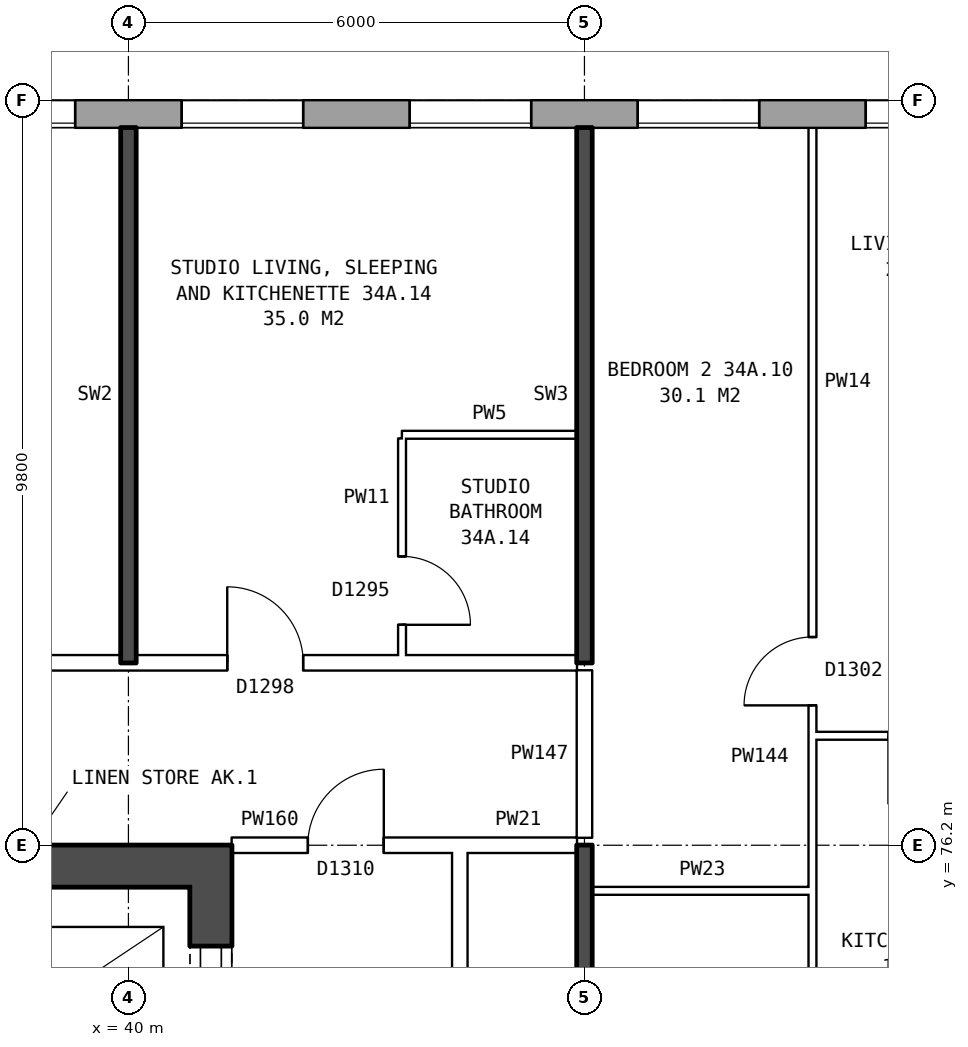
"""IFC4 building model, lengths in metres.
Left out: names, types, materials, properties, quantities, classifications, styles, units other than length and angle.
Written with IfcOpenShell. Run it as: python <this file> out.ifc"""

import sys

from ifc_helpers import new_model, si_unit, direction, frame, frame_2d, origin, place, context, subcontext, project, spatial, rectangle, extrude, element, fill, save


model = new_model("IFC4")
c1 = context("Model", 3, precision=1e-05, world=origin(), true_north=direction((0.0, 1.0)))
c2 = subcontext(c1, "Body", "Model", "MODEL_VIEW")
j1 = project(units=[si_unit("LENGTHUNIT", "METRE"), si_unit("PLANEANGLEUNIT", "RADIAN")], contexts=[c1])
p1 = place(None, origin())
s1 = spatial("IfcSite", under=j1, at=p1, CompositionType="ELEMENT")
p2 = place(p1, origin())
s2 = spatial("IfcBuilding", under=s1, at=p2, CompositionType="ELEMENT")
p3 = place(p2, frame((0.0, 0.0, 123.7)))
s3 = spatial("IfcBuildingStorey", under=s2, at=p3, CompositionType="ELEMENT", Elevation=123.7)
p4 = place(p3, frame((72.925, 85.82, 0.0), z_axis=(0.0, 0.0, 1.0), x_axis=(-1.0, 0.0, 0.0)))
e1 = element("IfcWall", 1, at=p4, inside=s3, PredefinedType="STANDARD", context=c2, shape_type="SweptSolid", body=[
    extrude(rectangle(XDim=43.101, YDim=0.36, at=frame_2d((21.55, 0.0))), origin(), (0.0, 0.0, 1.0), 2.85),
])
p5 = place(p4, frame((0.625, 0.0, 0.8)))
e2 = element("IfcOpeningElement", 2, at=p5, cuts=e1, PredefinedType="OPENING", context=c2, shape_type="SweptSolid", body=[
    extrude(rectangle(XDim=1.6, YDim=1.8, at=frame_2d((0.8, 0.9))), frame((0.0, 0.19, 0.0), z_axis=(0.0, -1.0, 0.0), x_axis=(1.0, 0.0, 0.0)), (0.0, 0.0, 1.0), 0.38),
])
p6 = place(p4, frame((4.125, 0.0, 0.8)))
e3 = element("IfcOpeningElement", 3, at=p6, cuts=e1, PredefinedType="OPENING", context=c2, shape_type="SweptSolid", body=[
    extrude(rectangle(XDim=0.6, YDim=0.9, at=frame_2d((0.3, 0.45))), frame((0.0, 0.19, 0.0), z_axis=(0.0, -1.0, 0.0), x_axis=(1.0, 0.0, 0.0)), (0.0, 0.0, 1.0), 0.38),
])
p7 = place(p4, frame((6.625, 0.0, 0.8)))
e4 = element("IfcOpeningElement", 4, at=p7, cuts=e1, PredefinedType="OPENING", context=c2, shape_type="SweptSolid", body=[
    extrude(rectangle(XDim=1.6, YDim=1.8, at=frame_2d((0.8, 0.9))), frame((0.0, 0.19, 0.0), z_axis=(0.0, -1.0, 0.0), x_axis=(1.0, 0.0, 0.0)), (0.0, 0.0, 1.0), 0.38),
])
p8 = place(p4, frame((9.625, 0.0, 0.8)))
e5 = element("IfcOpeningElement", 5, at=p8, cuts=e1, PredefinedType="OPENING", context=c2, shape_type="SweptSolid", body=[
    extrude(rectangle(XDim=1.6, YDim=1.8, at=frame_2d((0.8, 0.9))), frame((0.0, 0.19, 0.0), z_axis=(0.0, -1.0, 0.0), x_axis=(1.0, 0.0, 0.0)), (0.0, 0.0, 1.0), 0.38),
])
p9 = place(p4, frame((12.625, 0.0, 0.8)))
e6 = element("IfcOpeningElement", 6, at=p9, cuts=e1, PredefinedType="OPENING", context=c2, shape_type="SweptSolid", body=[
    extrude(rectangle(XDim=1.6, YDim=1.8, at=frame_2d((0.8, 0.9))), frame((0.0, 0.19, 0.0), z_axis=(0.0, -1.0, 0.0), x_axis=(1.0, 0.0, 0.0)), (0.0, 0.0, 1.0), 0.38),
])
p10 = place(p4, frame((15.625, 0.0, 0.8)))
e7 = element("IfcOpeningElement", 7, at=p10, cuts=e1, PredefinedType="OPENING", context=c2, shape_type="SweptSolid", body=[
    extrude(rectangle(XDim=1.6, YDim=1.8, at=frame_2d((0.8, 0.9))), frame((0.0, 0.19, 0.0), z_axis=(0.0, -1.0, 0.0), x_axis=(1.0, 0.0, 0.0)), (0.0, 0.0, 1.0), 0.38),
])
p11 = place(p4, frame((18.625, 0.0, 0.8)))
e8 = element("IfcOpeningElement", 8, at=p11, cuts=e1, PredefinedType="OPENING", context=c2, shape_type="SweptSolid", body=[
    extrude(rectangle(XDim=1.6, YDim=1.8, at=frame_2d((0.8, 0.9))), frame((0.0, 0.19, 0.0), z_axis=(0.0, -1.0, 0.0), x_axis=(1.0, 0.0, 0.0)), (0.0, 0.0, 1.0), 0.38),
])
p12 = place(p4, frame((21.625, 0.0, 0.8)))
e9 = element("IfcOpeningElement", 9, at=p12, cuts=e1, PredefinedType="OPENING", context=c2, shape_type="SweptSolid", body=[
    extrude(rectangle(XDim=1.6, YDim=1.8, at=frame_2d((0.8, 0.9))), frame((0.0, 0.19, 0.0), z_axis=(0.0, -1.0, 0.0), x_axis=(1.0, 0.0, 0.0)), (0.0, 0.0, 1.0), 0.38),
])
p13 = place(p4, frame((24.625, 0.0, 0.8)))
e10 = element("IfcOpeningElement", 10, at=p13, cuts=e1, PredefinedType="OPENING", context=c2, shape_type="SweptSolid", body=[
    extrude(rectangle(XDim=1.6, YDim=1.8, at=frame_2d((0.8, 0.9))), frame((0.0, 0.19, 0.0), z_axis=(0.0, -1.0, 0.0), x_axis=(1.0, 0.0, 0.0)), (0.0, 0.0, 1.0), 0.38),
])
p14 = place(p4, frame((27.625, 0.0, 0.8)))
e11 = element("IfcOpeningElement", 11, at=p14, cuts=e1, PredefinedType="OPENING", context=c2, shape_type="SweptSolid", body=[
    extrude(rectangle(XDim=1.6, YDim=1.8, at=frame_2d((0.8, 0.9))), frame((0.0, 0.19, 0.0), z_axis=(0.0, -1.0, 0.0), x_axis=(1.0, 0.0, 0.0)), (0.0, 0.0, 1.0), 0.38),
])
p15 = place(p4, frame((30.625, 0.0, 0.8)))
e12 = element("IfcOpeningElement", 12, at=p15, cuts=e1, PredefinedType="OPENING", context=c2, shape_type="SweptSolid", body=[
    extrude(rectangle(XDim=1.6, YDim=1.8, at=frame_2d((0.8, 0.9))), frame((0.0, 0.19, 0.0), z_axis=(0.0, -1.0, 0.0), x_axis=(1.0, 0.0, 0.0)), (0.0, 0.0, 1.0), 0.38),
])
p16 = place(p4, frame((33.625, 0.0, 0.8)))
e13 = element("IfcOpeningElement", 13, at=p16, cuts=e1, PredefinedType="OPENING", context=c2, shape_type="SweptSolid", body=[
    extrude(rectangle(XDim=1.6, YDim=1.8, at=frame_2d((0.8, 0.9))), frame((0.0, 0.19, 0.0), z_axis=(0.0, -1.0, 0.0), x_axis=(1.0, 0.0, 0.0)), (0.0, 0.0, 1.0), 0.38),
])
p17 = place(p4, frame((36.625, 0.0, 0.8)))
e14 = element("IfcOpeningElement", 14, at=p17, cuts=e1, PredefinedType="OPENING", context=c2, shape_type="SweptSolid", body=[
    extrude(rectangle(XDim=1.6, YDim=1.8, at=frame_2d((0.8, 0.9))), frame((0.0, 0.19, 0.0), z_axis=(0.0, -1.0, 0.0), x_axis=(1.0, 0.0, 0.0)), (0.0, 0.0, 1.0), 0.38),
])
p18 = place(p4, frame((40.125, 0.0, 1.7)))
e15 = element("IfcOpeningElement", 15, at=p18, cuts=e1, PredefinedType="OPENING", context=c2, shape_type="SweptSolid", body=[
    extrude(rectangle(XDim=0.6, YDim=0.9, at=frame_2d((0.3, 0.45))), frame((0.0, 0.19, 0.0), z_axis=(0.0, -1.0, 0.0), x_axis=(1.0, 0.0, 0.0)), (0.0, 0.0, 1.0), 0.38),
])
p19 = place(p4, frame((5.125, 0.0, 0.8)))
e16 = element("IfcOpeningElement", 16, at=p19, cuts=e1, PredefinedType="OPENING", context=c2, shape_type="SweptSolid", body=[
    extrude(rectangle(XDim=1.2, YDim=1.8, at=frame_2d((0.6, 0.9))), frame((0.0, 0.19, 0.0), z_axis=(0.0, -1.0, 0.0), x_axis=(1.0, 0.0, 0.0)), (0.0, 0.0, 1.0), 0.38),
])
p20 = place(p4, frame((41.125, 0.0, 0.8)))
e17 = element("IfcOpeningElement", 17, at=p20, cuts=e1, PredefinedType="OPENING", context=c2, shape_type="SweptSolid", body=[
    extrude(rectangle(XDim=1.6, YDim=1.8, at=frame_2d((0.8, 0.9))), frame((0.0, 0.19, 0.0), z_axis=(0.0, -1.0, 0.0), x_axis=(1.0, 0.0, 0.0)), (0.0, 0.0, 1.0), 0.38),
])
p21 = place(p3, frame((41.085, 76.2, 0.0), z_axis=(0.0, 0.0, 1.0), x_axis=(0.0, -1.0, 0.0)))
e18 = element("IfcWall", 18, at=p21, inside=s3, PredefinedType="SHEAR", context=c2, shape_type="SweptSolid", body=[
    extrude(rectangle(XDim=12.4, YDim=0.55, at=frame_2d((6.2, 0.0))), origin(), (0.0, 0.0, 1.0), 2.85),
])
p22 = place(p21, frame((1.325, 0.0, 0.0)))
e19 = element("IfcOpeningElement", 19, at=p22, cuts=e18, PredefinedType="OPENING", context=c2, shape_type="SweptSolid", body=[
    extrude(rectangle(XDim=1.1, YDim=2.1, at=frame_2d((0.55, 1.05))), frame((0.0, 0.285, 0.0), z_axis=(0.0, -1.0, 0.0), x_axis=(1.0, 0.0, 0.0)), (0.0, 0.0, 1.0), 0.57),
])
p23 = place(p21, frame((4.575, 0.0, 0.0)))
e20 = element("IfcOpeningElement", 20, at=p23, cuts=e18, PredefinedType="OPENING", context=c2, shape_type="SweptSolid", body=[
    extrude(rectangle(XDim=0.85, YDim=2.1, at=frame_2d((0.425, 1.05))), frame((0.0, 0.285, 0.0), z_axis=(0.0, -1.0, 0.0), x_axis=(1.0, 0.0, 0.0)), (0.0, 0.0, 1.0), 0.57),
])
p24 = place(p21, frame((7.825, 0.0, 0.0)))
e21 = element("IfcOpeningElement", 21, at=p24, cuts=e18, PredefinedType="OPENING", context=c2, shape_type="SweptSolid", body=[
    extrude(rectangle(XDim=0.85, YDim=2.1, at=frame_2d((0.425, 1.05))), frame((0.0, 0.285, 0.0), z_axis=(0.0, -1.0, 0.0), x_axis=(1.0, 0.0, 0.0)), (0.0, 0.0, 1.0), 0.57),
])
p25 = place(p21, frame((9.9, 0.0, 0.0)))
e22 = element("IfcOpeningElement", 22, at=p25, cuts=e18, PredefinedType="OPENING", context=c2, shape_type="SweptSolid", body=[
    extrude(rectangle(XDim=1.1, YDim=2.1, at=frame_2d((0.55, 1.05))), frame((0.0, 0.285, 0.0), z_axis=(0.0, -1.0, 0.0), x_axis=(1.0, 0.0, 0.0)), (0.0, 0.0, 1.0), 0.57),
])
p26 = place(p3, frame((40.81, 75.925, 0.0), z_axis=(0.0, 0.0, 1.0), x_axis=(-1.0, 0.0, 0.0)))
e23 = element("IfcWall", 23, at=p26, inside=s3, PredefinedType="SHEAR", context=c2, shape_type="SweptSolid", body=[
    extrude(rectangle(XDim=7.9, YDim=0.55, at=frame_2d((3.95, 0.0))), origin(), (0.0, 0.0, 1.0), 2.85),
])
p27 = place(p3, frame((44.36, 63.9, 0.0), z_axis=(0.0, 0.0, 1.0), x_axis=(0.0, 1.0, 0.0)))
e24 = element("IfcWall", 24, at=p27, inside=s3, PredefinedType="PARTITIONING", context=c2, shape_type="SweptSolid", body=[
    extrude(rectangle(XDim=12.2, YDim=0.2, at=frame_2d((6.1, 0.0))), origin(), (0.0, 0.0, 1.0), 2.85),
])
p28 = place(p27, frame((5.1, 0.0, 0.0)))
e25 = element("IfcOpeningElement", 25, at=p28, cuts=e24, PredefinedType="OPENING", context=c2, shape_type="SweptSolid", body=[
    extrude(rectangle(XDim=2.0, YDim=2.1, at=frame_2d((1.0, 1.05))), frame((0.0, 0.11, 0.0), z_axis=(0.0, -1.0, 0.0), x_axis=(1.0, 0.0, 0.0)), (0.0, 0.0, 1.0), 0.22),
])
p29 = place(p3, frame((46.1, 75.6, 0.0), z_axis=(0.0, 0.0, 1.0), x_axis=(1.0, 0.0, 0.0)))
e26 = element("IfcWall", 26, at=p29, inside=s3, PredefinedType="PARTITIONING", context=c2, shape_type="SweptSolid", body=[
    extrude(rectangle(XDim=2.9, YDim=0.1, at=frame_2d((1.45, 0.0))), origin(), (0.0, 0.0, 1.0), 2.85),
])
p30 = place(p3, frame((41.36, 76.2, 0.0), z_axis=(0.0, 0.0, 1.0), x_axis=(1.0, 0.0, 0.0)))
e27 = element("IfcWall", 27, at=p30, inside=s3, PredefinedType="PARTITIONING", context=c2, shape_type="SweptSolid", body=[
    extrude(rectangle(XDim=3.0, YDim=0.2, at=frame_2d((1.5, 0.0))), origin(), (0.0, 0.0, 1.0), 2.85),
])
p31 = place(p30, frame((1.0, 0.0, 0.0)))
e28 = element("IfcOpeningElement", 28, at=p31, cuts=e27, PredefinedType="OPENING", context=c2, shape_type="SweptSolid", body=[
    extrude(rectangle(XDim=1.0, YDim=2.1, at=frame_2d((0.5, 1.05))), frame((0.0, 0.11, 0.0), z_axis=(0.0, -1.0, 0.0), x_axis=(1.0, 0.0, 0.0)), (0.0, 0.0, 1.0), 0.22),
])
p32 = place(p3, frame((44.36, 76.2, 0.0), z_axis=(0.0, 0.0, 1.0), x_axis=(1.0, 0.0, 0.0)))
e29 = element("IfcWall", 29, at=p32, inside=s3, PredefinedType="PARTITIONING", context=c2, shape_type="SweptSolid", body=[
    extrude(rectangle(XDim=1.54, YDim=0.2, at=frame_2d((0.77, 0.0))), origin(), (0.0, 0.0, 1.0), 2.85),
])
p33 = place(p3, frame((49.0, 77.64, 0.0), z_axis=(0.0, 0.0, 1.0), x_axis=(1.0, 0.0, 0.0)))
e30 = element("IfcWall", 30, at=p33, inside=s3, PredefinedType="PARTITIONING", context=c2, shape_type="SweptSolid", body=[
    extrude(rectangle(XDim=2.9, YDim=0.1, at=frame_2d((1.45, 0.0))), origin(), (0.0, 0.0, 1.0), 2.85),
])
p34 = place(p33, frame((1.0, 0.0, 0.0)))
e31 = element("IfcOpeningElement", 31, at=p34, cuts=e30, PredefinedType="OPENING", context=c2, shape_type="SweptSolid", body=[
    extrude(rectangle(XDim=0.9, YDim=2.1, at=frame_2d((0.45, 1.05))), frame((0.0, 0.06, 0.0), z_axis=(0.0, -1.0, 0.0), x_axis=(1.0, 0.0, 0.0)), (0.0, 0.0, 1.0), 0.12),
])
p35 = place(p3, frame((27.11, 78.6, 0.0), z_axis=(0.0, 0.0, 1.0), x_axis=(1.0, 0.0, 0.0)))
e32 = element("IfcWall", 32, at=p35, inside=s3, PredefinedType="PARTITIONING", context=c2, shape_type="SweptSolid", body=[
    extrude(rectangle(XDim=18.79, YDim=0.2, at=frame_2d((9.395, 0.0))), origin(), (0.0, 0.0, 1.0), 2.85),
])
p36 = place(p35, frame((14.19, 0.0, 0.0)))
e33 = element("IfcOpeningElement", 33, at=p36, cuts=e32, PredefinedType="OPENING", context=c2, shape_type="SweptSolid", body=[
    extrude(rectangle(XDim=1.0, YDim=2.1, at=frame_2d((0.5, 1.05))), frame((0.0, 0.11, 0.0), z_axis=(0.0, -1.0, 0.0), x_axis=(1.0, 0.0, 0.0)), (0.0, 0.0, 1.0), 0.22),
])
p37 = place(p35, frame((10.39, 0.0, 0.0)))
e34 = element("IfcOpeningElement", 34, at=p37, cuts=e32, PredefinedType="OPENING", context=c2, shape_type="SweptSolid", body=[
    extrude(rectangle(XDim=1.0, YDim=2.1, at=frame_2d((0.5, 1.05))), frame((0.0, 0.11, 0.0), z_axis=(0.0, -1.0, 0.0), x_axis=(1.0, 0.0, 0.0)), (0.0, 0.0, 1.0), 0.22),
])
p38 = place(p35, frame((4.59, 0.0, 0.0)))
e35 = element("IfcOpeningElement", 35, at=p38, cuts=e32, PredefinedType="OPENING", context=c2, shape_type="SweptSolid", body=[
    extrude(rectangle(XDim=1.0, YDim=2.1, at=frame_2d((0.5, 1.05))), frame((0.0, 0.11, 0.0), z_axis=(0.0, -1.0, 0.0), x_axis=(1.0, 0.0, 0.0)), (0.0, 0.0, 1.0), 0.22),
])
p39 = place(p3, frame((43.6, 81.6, 0.0), z_axis=(0.0, 0.0, 1.0), x_axis=(1.0, 0.0, 0.0)))
e36 = element("IfcWall", 36, at=p39, inside=s3, PredefinedType="PARTITIONING", context=c2, shape_type="SweptSolid", body=[
    extrude(rectangle(XDim=2.3, YDim=0.1, at=frame_2d((1.15, 0.0))), origin(), (0.0, 0.0, 1.0), 2.85),
])
p40 = place(p3, frame((40.0, 78.6, 0.0), z_axis=(0.0, 0.0, 1.0), x_axis=(0.0, 1.0, 0.0)))
e37 = element("IfcWall", 37, at=p40, inside=s3, PredefinedType="SOLIDWALL", context=c2, shape_type="SweptSolid", body=[
    extrude(rectangle(XDim=7.04, YDim=0.2, at=frame_2d((3.52, 0.0))), origin(), (0.0, 0.0, 1.0), 2.85),
])
p41 = place(p3, frame((43.6, 78.7, 0.0), z_axis=(0.0, 0.0, 1.0), x_axis=(0.0, 1.0, 0.0)))
e38 = element("IfcWall", 38, at=p41, inside=s3, PredefinedType="PARTITIONING", context=c2, shape_type="SweptSolid", body=[
    extrude(rectangle(XDim=2.85, YDim=0.1, at=frame_2d((1.425, 0.0))), origin(), (0.0, 0.0, 1.0), 2.85),
])
p42 = place(p41, frame((0.4, 0.0, 0.0)))
e39 = element("IfcOpeningElement", 39, at=p42, cuts=e38, PredefinedType="OPENING", context=c2, shape_type="SweptSolid", body=[
    extrude(rectangle(XDim=0.9, YDim=2.1, at=frame_2d((0.45, 1.05))), frame((0.0, 0.06, 0.0), z_axis=(0.0, -1.0, 0.0), x_axis=(1.0, 0.0, 0.0)), (0.0, 0.0, 1.0), 0.12),
])
p43 = place(p3, frame((46.0, 71.2, 0.0), z_axis=(0.0, 0.0, 1.0), x_axis=(0.0, 1.0, 0.0)))
e40 = element("IfcWall", 40, at=p43, inside=s3, PredefinedType="SOLIDWALL", context=c2, shape_type="SweptSolid", body=[
    extrude(rectangle(XDim=5.0, YDim=0.2, at=frame_2d((2.5, 0.0))), origin(), (0.0, 0.0, 1.0), 2.85),
])
p44 = place(p3, frame((46.0, 76.3, 0.0), z_axis=(0.0, 0.0, 1.0), x_axis=(0.0, 1.0, 0.0)))
e41 = element("IfcWall", 41, at=p44, inside=s3, PredefinedType="PARTITIONING", context=c2, shape_type="SweptSolid", body=[
    extrude(rectangle(XDim=2.2, YDim=0.2, at=frame_2d((1.1, 0.0))), origin(), (0.0, 0.0, 1.0), 2.85),
])
p45 = place(p3, frame((46.0, 78.6, 0.0), z_axis=(0.0, 0.0, 1.0), x_axis=(0.0, 1.0, 0.0)))
e42 = element("IfcWall", 42, at=p45, inside=s3, PredefinedType="SOLIDWALL", context=c2, shape_type="SweptSolid", body=[
    extrude(rectangle(XDim=7.04, YDim=0.2, at=frame_2d((3.52, 0.0))), origin(), (0.0, 0.0, 1.0), 2.85),
])
p46 = place(p3, frame((49.0, 71.3, 0.0), z_axis=(0.0, 0.0, 1.0), x_axis=(0.0, 1.0, 0.0)))
e43 = element("IfcWall", 43, at=p46, inside=s3, PredefinedType="PARTITIONING", context=c2, shape_type="SweptSolid", body=[
    extrude(rectangle(XDim=14.34, YDim=0.1, at=frame_2d((7.17, 0.0))), origin(), (0.0, 0.0, 1.0), 2.85),
])
p47 = place(p46, frame((6.74, 0.0, 0.0)))
e44 = element("IfcOpeningElement", 44, at=p47, cuts=e43, PredefinedType="OPENING", context=c2, shape_type="SweptSolid", body=[
    extrude(rectangle(XDim=0.9, YDim=2.1, at=frame_2d((0.45, 1.05))), frame((0.0, 0.06, 0.0), z_axis=(0.0, -1.0, 0.0), x_axis=(1.0, 0.0, 0.0)), (0.0, 0.0, 1.0), 0.12),
])
p48 = place(p46, frame((0.4, 0.0, 0.0)))
e45 = element("IfcOpeningElement", 45, at=p48, cuts=e43, PredefinedType="OPENING", context=c2, shape_type="SweptSolid", body=[
    extrude(rectangle(XDim=0.9, YDim=2.1, at=frame_2d((0.45, 1.05))), frame((0.0, 0.06, 0.0), z_axis=(0.0, -1.0, 0.0), x_axis=(1.0, 0.0, 0.0)), (0.0, 0.0, 1.0), 0.12),
])
p49 = place(p12, origin())
e46 = element("IfcWindow", 46, at=p49, inside=s3, PartitioningType="SINGLE_PANEL", PredefinedType="WINDOW", context=c2, shape_type="SweptSolid", body=[
    extrude(rectangle(XDim=1.6, YDim=1.8, at=frame_2d((0.8, 0.9))), frame((0.0, 0.15, 0.0), z_axis=(0.0, -1.0, 0.0), x_axis=(1.0, 0.0, 0.0)), (0.0, 0.0, 1.0), 0.06),
])
fill(e9, e46)
p50 = place(p13, origin())
e47 = element("IfcWindow", 47, at=p50, inside=s3, PartitioningType="SINGLE_PANEL", PredefinedType="WINDOW", context=c2, shape_type="SweptSolid", body=[
    extrude(rectangle(XDim=1.6, YDim=1.8, at=frame_2d((0.8, 0.9))), frame((0.0, 0.15, 0.0), z_axis=(0.0, -1.0, 0.0), x_axis=(1.0, 0.0, 0.0)), (0.0, 0.0, 1.0), 0.06),
])
fill(e10, e47)
p51 = place(p14, origin())
e48 = element("IfcWindow", 48, at=p51, inside=s3, PartitioningType="SINGLE_PANEL", PredefinedType="WINDOW", context=c2, shape_type="SweptSolid", body=[
    extrude(rectangle(XDim=1.6, YDim=1.8, at=frame_2d((0.8, 0.9))), frame((0.0, 0.15, 0.0), z_axis=(0.0, -1.0, 0.0), x_axis=(1.0, 0.0, 0.0)), (0.0, 0.0, 1.0), 0.06),
])
fill(e11, e48)
p52 = place(p15, origin())
e49 = element("IfcWindow", 49, at=p52, inside=s3, PartitioningType="SINGLE_PANEL", PredefinedType="WINDOW", context=c2, shape_type="SweptSolid", body=[
    extrude(rectangle(XDim=1.6, YDim=1.8, at=frame_2d((0.8, 0.9))), frame((0.0, 0.15, 0.0), z_axis=(0.0, -1.0, 0.0), x_axis=(1.0, 0.0, 0.0)), (0.0, 0.0, 1.0), 0.06),
])
fill(e12, e49)
p53 = place(p16, origin())
e50 = element("IfcWindow", 50, at=p53, inside=s3, PartitioningType="SINGLE_PANEL", PredefinedType="WINDOW", context=c2, shape_type="SweptSolid", body=[
    extrude(rectangle(XDim=1.6, YDim=1.8, at=frame_2d((0.8, 0.9))), frame((0.0, 0.15, 0.0), z_axis=(0.0, -1.0, 0.0), x_axis=(1.0, 0.0, 0.0)), (0.0, 0.0, 1.0), 0.06),
])
fill(e13, e50)
p54 = place(p22, origin())
e51 = element("IfcDoor", 51, at=p54, inside=s3, OperationType="DOUBLE_DOOR_SLIDING", PredefinedType="DOOR", context=c2, shape_type="SweptSolid", body=[
    extrude(rectangle(XDim=1.1, YDim=2.1, at=frame_2d((0.55, 1.05))), frame((0.0, -0.21, 0.0), z_axis=(0.0, -1.0, 0.0), x_axis=(1.0, 0.0, 0.0)), (0.0, 0.0, 1.0), 0.05),
])
fill(e19, e51)
p55 = place(p31, origin())
e52 = element("IfcDoor", 52, at=p55, inside=s3, OperationType="SINGLE_SWING_RIGHT", PredefinedType="DOOR", context=c2, shape_type="SweptSolid", body=[
    extrude(rectangle(XDim=1.0, YDim=2.1, at=frame_2d((0.5, 1.05))), frame((0.0, 0.025, 0.0), z_axis=(0.0, -1.0, 0.0), x_axis=(1.0, 0.0, 0.0)), (0.0, 0.0, 1.0), 0.05),
])
fill(e28, e52)
p56 = place(p47, origin())
e53 = element("IfcDoor", 53, at=p56, inside=s3, OperationType="SINGLE_SWING_LEFT", PredefinedType="DOOR", context=c2, shape_type="SweptSolid", body=[
    extrude(rectangle(XDim=0.9, YDim=2.1, at=frame_2d((0.45, 1.05))), frame((0.0, 0.025, 0.0), z_axis=(0.0, -1.0, 0.0), x_axis=(1.0, 0.0, 0.0)), (0.0, 0.0, 1.0), 0.05),
])
fill(e44, e53)
p57 = place(p36, origin())
e54 = element("IfcDoor", 54, at=p57, inside=s3, OperationType="SINGLE_SWING_LEFT", PredefinedType="DOOR", context=c2, shape_type="SweptSolid", body=[
    extrude(rectangle(XDim=1.0, YDim=2.1, at=frame_2d((0.5, 1.05))), frame((0.0, 0.025, 0.0), z_axis=(0.0, -1.0, 0.0), x_axis=(1.0, 0.0, 0.0)), (0.0, 0.0, 1.0), 0.05),
])
fill(e33, e54)
p58 = place(p42, frame((0.9, 0.0, 0.0), z_axis=(0.0, 0.0, 1.0), x_axis=(-1.0, 0.0, 0.0)))
e55 = element("IfcDoor", 55, at=p58, inside=s3, OperationType="SINGLE_SWING_RIGHT", PredefinedType="DOOR", context=c2, shape_type="SweptSolid", body=[
    extrude(rectangle(XDim=0.9, YDim=2.1, at=frame_2d((0.45, 1.05))), frame((0.0, 0.025, 0.0), z_axis=(0.0, -1.0, 0.0), x_axis=(1.0, 0.0, 0.0)), (0.0, 0.0, 1.0), 0.05),
])
fill(e39, e55)
save(model, sys.argv[1])
